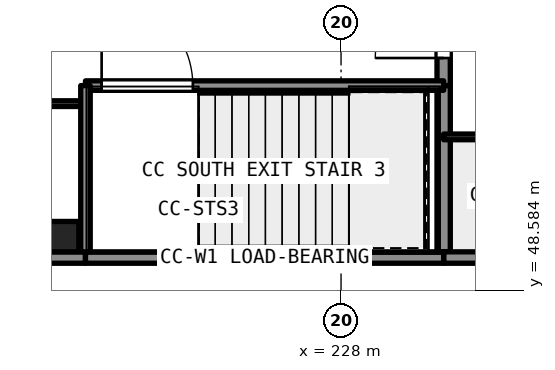
"""IFC4 building model, lengths in metres.
Left out: names, types, materials, properties, quantities, classifications, styles, units other than length and angle.
Written with IfcOpenShell. Run it as: python <this file> out.ifc"""

import sys

from ifc_helpers import new_model, si_unit, direction, frame, frame_2d, origin, origin_2d, place, context, subcontext, project, spatial, rectangle, extrude, element, fill, save


model = new_model("IFC4")
c1 = context("Model", 3, precision=1e-05, world=origin(), true_north=direction((0.0, 1.0)))
c2 = subcontext(c1, "Body", "Model", "MODEL_VIEW")
j1 = project(units=[si_unit("LENGTHUNIT", "METRE"), si_unit("PLANEANGLEUNIT", "RADIAN")], contexts=[c1])
p1 = place(None, origin())
s1 = spatial("IfcSite", under=j1, at=p1, CompositionType="ELEMENT")
p2 = place(p1, origin())
s2 = spatial("IfcBuilding", under=s1, at=p2, CompositionType="ELEMENT")
p3 = place(p2, frame((0.0, 0.0, 9.0)))
s3 = spatial("IfcBuildingStorey", under=s2, at=p3, CompositionType="ELEMENT", Elevation=9.0)
p4 = place(p3, frame((220.7, 50.0, 0.0), z_axis=(0.0, 0.0, 1.0), x_axis=(1.0, 0.0, 0.0)))
e1 = element("IfcColumn", 1, at=p4, inside=s3, PredefinedType="COLUMN", context=c2, shape_type="SweptSolid", body=[
    extrude(rectangle(XDim=0.8, YDim=0.8, at=origin_2d()), origin(), (0.0, 0.0, 1.0), 6.0),
])
p5 = place(p3, frame((230.7, 49.6, 0.0), z_axis=(0.0, 0.0, 1.0), x_axis=(0.0, 1.0, 0.0)))
e2 = element("IfcWall", 2, at=p5, inside=s3, PredefinedType="SHEAR", context=c2, shape_type="SweptSolid", body=[
    extrude(rectangle(XDim=4.375, YDim=0.35, at=frame_2d((2.188, 0.0))), origin(), (0.0, 0.0, 1.0), 5.59),
])
p6 = place(p3, frame((230.7, 53.975, 0.0), z_axis=(0.0, 0.0, 1.0), x_axis=(0.0, 1.0, 0.0)))
e3 = element("IfcWall", 3, at=p6, inside=s3, PredefinedType="SHEAR", context=c2, shape_type="SweptSolid", body=[
    extrude(rectangle(XDim=2.875, YDim=0.35, at=frame_2d((1.438, 0.0))), origin(), (0.0, 0.0, 1.0), 5.59),
])
p7 = place(p6, frame((0.725, 0.0, 0.0)))
e4 = element("IfcOpeningElement", 4, at=p7, cuts=e3, PredefinedType="OPENING", context=c2, shape_type="SweptSolid", body=[
    extrude(rectangle(XDim=1.8, YDim=2.1, at=frame_2d((0.9, 1.05))), frame((0.0, 0.186, 0.0), z_axis=(0.0, -1.0, 0.0), x_axis=(1.0, 0.0, 0.0)), (0.0, 0.0, 1.0), 0.371),
])
p8 = place(p3, frame((230.7, 49.45, 0.0), z_axis=(0.0, 0.0, 1.0), x_axis=(1.0, 0.0, 0.0)))
e5 = element("IfcWall", 5, at=p8, inside=s3, PredefinedType="SOLIDWALL", context=c2, shape_type="SweptSolid", body=[
    extrude(rectangle(XDim=6.825, YDim=0.3, at=frame_2d((3.413, 0.0))), origin(), (0.0, 0.0, 1.0), 5.59),
])
p9 = place(p3, frame((237.525, 52.625, 0.0), z_axis=(0.0, 0.0, 1.0), x_axis=(-1.0, 0.0, 0.0)))
e6 = element("IfcWall", 6, at=p9, inside=s3, PredefinedType="PARTITIONING", context=c2, shape_type="SweptSolid", body=[
    extrude(rectangle(XDim=6.825, YDim=0.15, at=frame_2d((3.413, 0.0))), origin(), (0.0, 0.0, 1.0), 5.59),
])
p10 = place(p9, frame((2.975, 0.0, 0.0)))
e7 = element("IfcOpeningElement", 7, at=p10, cuts=e6, PredefinedType="OPENING", context=c2, shape_type="SweptSolid", body=[
    extrude(rectangle(XDim=0.9, YDim=2.1, at=frame_2d((0.45, 1.05))), frame((0.0, 0.085, 0.0), z_axis=(0.0, -1.0, 0.0), x_axis=(1.0, 0.0, 0.0)), (0.0, 0.0, 1.0), 0.171),
])
p11 = place(p3, frame((210.175, 49.45, 0.0), z_axis=(0.0, 0.0, 1.0), x_axis=(1.0, 0.0, 0.0)))
e8 = element("IfcWall", 8, at=p11, inside=s3, PredefinedType="SOLIDWALL", context=c2, shape_type="SweptSolid", body=[
    extrude(rectangle(XDim=11.1, YDim=0.3, at=frame_2d((5.55, 0.0))), origin(), (0.0, 0.0, 1.0), 5.59),
])
p12 = place(p11, frame((2.725, 0.0, 0.9)))
e9 = element("IfcOpeningElement", 9, at=p12, cuts=e8, PredefinedType="OPENING", context=c2, shape_type="SweptSolid", body=[
    extrude(rectangle(XDim=2.4, YDim=1.8, at=frame_2d((1.2, 0.9))), frame((0.0, 0.161, 0.0), z_axis=(0.0, -1.0, 0.0), x_axis=(1.0, 0.0, 0.0)), (0.0, 0.0, 1.0), 0.321),
])
p13 = place(p3, frame((221.275, 49.45, 0.0), z_axis=(0.0, 0.0, 1.0), x_axis=(1.0, 0.0, 0.0)))
e10 = element("IfcWall", 10, at=p13, inside=s3, PredefinedType="SOLIDWALL", context=c2, shape_type="SweptSolid", body=[
    extrude(rectangle(XDim=9.425, YDim=0.3, at=frame_2d((4.712, 0.0))), origin(), (0.0, 0.0, 1.0), 5.59),
])
p14 = place(p13, frame((3.125, 0.0, 0.9)))
e11 = element("IfcOpeningElement", 11, at=p14, cuts=e10, PredefinedType="OPENING", context=c2, shape_type="SweptSolid", body=[
    extrude(rectangle(XDim=2.4, YDim=1.8, at=frame_2d((1.2, 0.9))), frame((0.0, 0.161, 0.0), z_axis=(0.0, -1.0, 0.0), x_axis=(1.0, 0.0, 0.0)), (0.0, 0.0, 1.0), 0.321),
])
p15 = place(p3, frame((210.175, 53.5, 0.0), z_axis=(0.0, 0.0, 1.0), x_axis=(1.0, 0.0, 0.0)))
e12 = element("IfcWall", 12, at=p15, inside=s3, PredefinedType="PARTITIONING", context=c2, shape_type="SweptSolid", body=[
    extrude(rectangle(XDim=11.1, YDim=0.15, at=frame_2d((5.55, 0.0))), origin(), (0.0, 0.0, 1.0), 5.59),
])
p16 = place(p15, frame((2.2, 0.0, 0.0)))
e13 = element("IfcOpeningElement", 13, at=p16, cuts=e12, PredefinedType="OPENING", context=c2, shape_type="SweptSolid", body=[
    extrude(rectangle(XDim=1.0, YDim=2.1, at=frame_2d((0.5, 1.05))), frame((0.0, 0.085, 0.0), z_axis=(0.0, -1.0, 0.0), x_axis=(1.0, 0.0, 0.0)), (0.0, 0.0, 1.0), 0.171),
])
p17 = place(p15, frame((7.725, 0.0, 0.0)))
e14 = element("IfcOpeningElement", 14, at=p17, cuts=e12, PredefinedType="OPENING", context=c2, shape_type="SweptSolid", body=[
    extrude(rectangle(XDim=1.0, YDim=2.1, at=frame_2d((0.5, 1.05))), frame((0.0, 0.085, 0.0), z_axis=(0.0, -1.0, 0.0), x_axis=(1.0, 0.0, 0.0)), (0.0, 0.0, 1.0), 0.171),
])
p18 = place(p3, frame((221.275, 53.975, 0.0), z_axis=(0.0, 0.0, 1.0), x_axis=(1.0, 0.0, 0.0)))
e15 = element("IfcWall", 15, at=p18, inside=s3, PredefinedType="SHEAR", context=c2, shape_type="SweptSolid", body=[
    extrude(rectangle(XDim=9.425, YDim=0.25, at=frame_2d((4.712, 0.0))), origin(), (0.0, 0.0, 1.0), 5.59),
])
p19 = place(p18, frame((0.425, 0.0, 0.0)))
e16 = element("IfcOpeningElement", 16, at=p19, cuts=e15, PredefinedType="OPENING", context=c2, shape_type="SweptSolid", body=[
    extrude(rectangle(XDim=2.4, YDim=2.1, at=frame_2d((1.2, 1.05))), frame((0.0, 0.135, 0.0), z_axis=(0.0, -1.0, 0.0), x_axis=(1.0, 0.0, 0.0)), (0.0, 0.0, 1.0), 0.271),
])
p20 = place(p3, frame((221.275, 49.6, 0.0), z_axis=(0.0, 0.0, 1.0), x_axis=(0.0, 1.0, 0.0)))
e17 = element("IfcWall", 17, at=p20, inside=s3, PredefinedType="SHEAR", context=c2, shape_type="SweptSolid", body=[
    extrude(rectangle(XDim=4.375, YDim=0.25, at=frame_2d((2.188, 0.0))), origin(), (0.0, 0.0, 1.0), 5.59),
])
p21 = place(p7, origin())
e18 = element("IfcDoor", 18, at=p21, inside=s3, OperationType="DOUBLE_DOOR_SINGLE_SWING", PredefinedType="DOOR", context=c2, shape_type="SweptSolid", body=[
    extrude(rectangle(XDim=1.8, YDim=2.1, at=frame_2d((0.9, 1.05))), frame((0.0, 0.025, 0.0), z_axis=(0.0, -1.0, 0.0), x_axis=(1.0, 0.0, 0.0)), (0.0, 0.0, 1.0), 0.05),
])
fill(e4, e18)
p22 = place(p19, origin())
e19 = element("IfcDoor", 19, at=p22, inside=s3, OperationType="DOUBLE_DOOR_SINGLE_SWING", PredefinedType="DOOR", context=c2, shape_type="SweptSolid", body=[
    extrude(rectangle(XDim=2.4, YDim=2.1, at=frame_2d((1.2, 1.05))), frame((0.0, 0.025, 0.0), z_axis=(0.0, -1.0, 0.0), x_axis=(1.0, 0.0, 0.0)), (0.0, 0.0, 1.0), 0.05),
])
fill(e16, e19)
p23 = place(p14, origin())
e20 = element("IfcWindow", 20, at=p23, inside=s3, PartitioningType="DOUBLE_PANEL_VERTICAL", PredefinedType="WINDOW", context=c2, shape_type="SweptSolid", body=[
    extrude(rectangle(XDim=2.4, YDim=1.8, at=frame_2d((1.2, 0.9))), frame((0.0, 0.03, 0.0), z_axis=(0.0, -1.0, 0.0), x_axis=(1.0, 0.0, 0.0)), (0.0, 0.0, 1.0), 0.06),
])
fill(e11, e20)
save(model, sys.argv[1])
